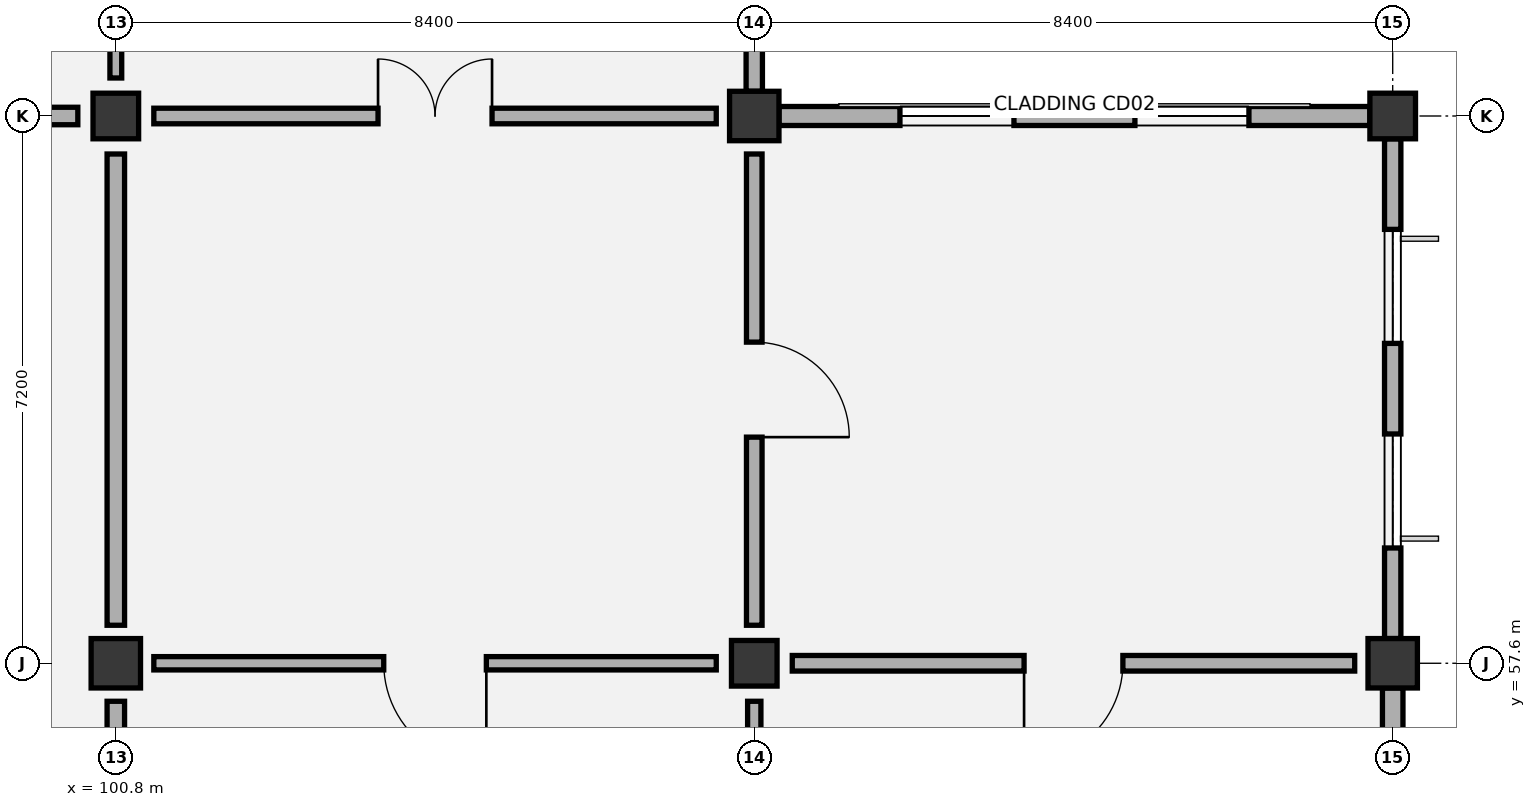
"""IFC4 building model, lengths in metres.
Left out: names, types, materials, properties, quantities, classifications, styles, units other than length and angle.
Written with IfcOpenShell. Run it as: python <this file> out.ifc"""

import sys

from ifc_helpers import new_model, si_unit, direction, frame, frame_2d, origin, origin_2d, place, context, subcontext, project, spatial, rectangle, extrude, element, fill, save


model = new_model("IFC4")
c1 = context("Model", 3, precision=1e-05, world=origin(), true_north=direction((0.0, 1.0)))
c2 = subcontext(c1, "Body", "Model", "MODEL_VIEW")
j1 = project(units=[si_unit("LENGTHUNIT", "METRE"), si_unit("PLANEANGLEUNIT", "RADIAN")], contexts=[c1])
p1 = place(None, origin())
s1 = spatial("IfcSite", under=j1, at=p1, CompositionType="ELEMENT")
p2 = place(p1, origin())
s2 = spatial("IfcBuilding", under=s1, at=p2, CompositionType="ELEMENT")
p3 = place(p2, frame((0.0, 0.0, 56.4)))
s3 = spatial("IfcBuildingStorey", under=s2, at=p3, CompositionType="ELEMENT", Elevation=56.4)
p4 = place(p3, frame((100.8, 57.6, 0.0), z_axis=(0.0, 0.0, 1.0), x_axis=(1.0, 0.0, 0.0)))
e1 = element("IfcColumn", 1, at=p4, inside=s3, PredefinedType="COLUMN", context=c2, shape_type="SweptSolid", body=[
    extrude(rectangle(XDim=0.65, YDim=0.65, at=origin_2d()), origin(), (0.0, 0.0, 1.0), 4.2),
])
for number, where, z_axis, x_axis in (
    (2, (100.8, 64.8, 0.0), (0.0, 0.0, 1.0), (1.0, 0.0, 0.0)),
    (3, (109.2, 57.6, 0.0), (0.0, 0.0, 1.0), (1.0, 0.0, 0.0)),
):
    element("IfcColumn", number, at=place(p3, frame(where, z_axis=z_axis, x_axis=x_axis)), inside=s3, PredefinedType="COLUMN", context=c2, shape_type="SweptSolid", body=[
        extrude(rectangle(XDim=0.6, YDim=0.6, at=origin_2d()), origin(), (0.0, 0.0, 1.0), 4.2),
    ])
for number, where, z_axis, x_axis in (
    (4, (109.2, 64.8, 0.0), (0.0, 0.0, 1.0), (1.0, 0.0, 0.0)),
    (5, (117.6, 57.6, 0.0), (0.0, 0.0, 1.0), (1.0, 0.0, 0.0)),
):
    element("IfcColumn", number, at=place(p3, frame(where, z_axis=z_axis, x_axis=x_axis)), inside=s3, PredefinedType="COLUMN", context=c2, shape_type="SweptSolid", body=[
        extrude(rectangle(XDim=0.65, YDim=0.65, at=origin_2d()), origin(), (0.0, 0.0, 1.0), 4.2),
    ])
p5 = place(p3, frame((117.6, 64.8, 0.0), z_axis=(0.0, 0.0, 1.0), x_axis=(1.0, 0.0, 0.0)))
e6 = element("IfcColumn", 6, at=p5, inside=s3, PredefinedType="COLUMN", context=c2, shape_type="SweptSolid", body=[
    extrude(rectangle(XDim=0.6, YDim=0.6, at=origin_2d()), origin(), (0.0, 0.0, 1.0), 4.2),
])
p6 = place(p3, frame((109.2, 65.125, 0.0), z_axis=(0.0, 0.0, 1.0), x_axis=(0.0, 1.0, 0.0)))
e7 = element("IfcWall", 7, at=p6, inside=s3, PredefinedType="SOLIDWALL", context=c2, shape_type="SweptSolid", body=[
    extrude(rectangle(XDim=6.575, YDim=0.215, at=frame_2d((3.288, 0.0))), origin(), (0.0, 0.0, 1.0), 3.365),
])
p7 = place(p6, frame((1.092, 0.0, 0.95)))
e8 = element("IfcOpeningElement", 8, at=p7, cuts=e7, PredefinedType="OPENING", context=c2, shape_type="SweptSolid", body=[
    extrude(rectangle(XDim=1.65, YDim=1.65, at=frame_2d((0.825, 0.825))), frame((0.0, 0.117, 0.0), z_axis=(0.0, -1.0, 0.0), x_axis=(1.0, 0.0, 0.0)), (0.0, 0.0, 1.0), 0.235),
])
p8 = place(p6, frame((3.833, 0.0, 0.95)))
e9 = element("IfcOpeningElement", 9, at=p8, cuts=e7, PredefinedType="OPENING", context=c2, shape_type="SweptSolid", body=[
    extrude(rectangle(XDim=1.65, YDim=1.65, at=frame_2d((0.825, 0.825))), frame((0.0, 0.117, 0.0), z_axis=(0.0, -1.0, 0.0), x_axis=(1.0, 0.0, 0.0)), (0.0, 0.0, 1.0), 0.235),
])
p9 = place(p3, frame((117.6, 50.7, 0.0), z_axis=(0.0, 0.0, 1.0), x_axis=(0.0, 1.0, 0.0)))
e10 = element("IfcWall", 10, at=p9, inside=s3, PredefinedType="SOLIDWALL", context=c2, shape_type="SweptSolid", body=[
    extrude(rectangle(XDim=6.575, YDim=0.27, at=frame_2d((3.288, 0.0))), origin(), (0.0, 0.0, 1.0), 3.295),
])
p10 = place(p3, frame((109.525, 64.8, 0.0), z_axis=(0.0, 0.0, 1.0), x_axis=(1.0, 0.0, 0.0)))
e11 = element("IfcWall", 11, at=p10, inside=s3, PredefinedType="SOLIDWALL", context=c2, shape_type="SweptSolid", body=[
    extrude(rectangle(XDim=7.775, YDim=0.25, at=frame_2d((3.888, 0.0))), origin(), (0.0, 0.0, 1.0), 3.295),
])
p11 = place(p10, frame((1.592, 0.0, 0.95)))
e12 = element("IfcOpeningElement", 12, at=p11, cuts=e11, PredefinedType="OPENING", context=c2, shape_type="SweptSolid", body=[
    extrude(rectangle(XDim=1.5, YDim=1.5, at=frame_2d((0.75, 0.75))), frame((0.0, 0.135, 0.0), z_axis=(0.0, -1.0, 0.0), x_axis=(1.0, 0.0, 0.0)), (0.0, 0.0, 1.0), 0.27),
])
p12 = place(p10, frame((4.683, 0.0, 0.95)))
e13 = element("IfcOpeningElement", 13, at=p12, cuts=e11, PredefinedType="OPENING", context=c2, shape_type="SweptSolid", body=[
    extrude(rectangle(XDim=1.5, YDim=1.5, at=frame_2d((0.75, 0.75))), frame((0.0, 0.135, 0.0), z_axis=(0.0, -1.0, 0.0), x_axis=(1.0, 0.0, 0.0)), (0.0, 0.0, 1.0), 0.27),
])
p13 = place(p3, frame((117.6, 57.925, 0.0), z_axis=(0.0, 0.0, 1.0), x_axis=(0.0, 1.0, 0.0)))
e14 = element("IfcWall", 14, at=p13, inside=s3, PredefinedType="SOLIDWALL", context=c2, shape_type="SweptSolid", body=[
    extrude(rectangle(XDim=6.575, YDim=0.215, at=frame_2d((3.288, 0.0))), origin(), (0.0, 0.0, 1.0), 3.295),
])
p14 = place(p13, frame((1.192, 0.0, 0.95)))
e15 = element("IfcOpeningElement", 15, at=p14, cuts=e14, PredefinedType="OPENING", context=c2, shape_type="SweptSolid", body=[
    extrude(rectangle(XDim=1.5, YDim=1.5, at=frame_2d((0.75, 0.75))), frame((0.0, 0.117, 0.0), z_axis=(0.0, -1.0, 0.0), x_axis=(1.0, 0.0, 0.0)), (0.0, 0.0, 1.0), 0.235),
])
p15 = place(p13, frame((3.883, 0.0, 0.95)))
e16 = element("IfcOpeningElement", 16, at=p15, cuts=e14, PredefinedType="OPENING", context=c2, shape_type="SweptSolid", body=[
    extrude(rectangle(XDim=1.5, YDim=1.5, at=frame_2d((0.75, 0.75))), frame((0.0, 0.117, 0.0), z_axis=(0.0, -1.0, 0.0), x_axis=(1.0, 0.0, 0.0)), (0.0, 0.0, 1.0), 0.235),
])
p16 = place(p3, frame((100.8, 50.9, 0.0), z_axis=(0.0, 0.0, 1.0), x_axis=(0.0, 1.0, 0.0)))
e17 = element("IfcWall", 17, at=p16, inside=s3, PredefinedType="PARTITIONING", context=c2, shape_type="SweptSolid", body=[
    extrude(rectangle(XDim=6.2, YDim=0.23, at=frame_2d((3.1, 0.0))), origin(), (0.0, 0.0, 1.0), 3.415),
])
p17 = place(p3, frame((100.8, 58.1, 0.0), z_axis=(0.0, 0.0, 1.0), x_axis=(0.0, 1.0, 0.0)))
e18 = element("IfcWall", 18, at=p17, inside=s3, PredefinedType="PARTITIONING", context=c2, shape_type="SweptSolid", body=[
    extrude(rectangle(XDim=6.2, YDim=0.23, at=frame_2d((3.1, 0.0))), origin(), (0.0, 0.0, 1.0), 3.625),
])
p18 = place(p3, frame((92.9, 64.8, 0.0), z_axis=(0.0, 0.0, 1.0), x_axis=(1.0, 0.0, 0.0)))
e19 = element("IfcWall", 19, at=p18, inside=s3, PredefinedType="PARTITIONING", context=c2, shape_type="SweptSolid", body=[
    extrude(rectangle(XDim=7.4, YDim=0.23, at=frame_2d((3.7, 0.0))), origin(), (0.0, 0.0, 1.0), 3.415),
])
p19 = place(p3, frame((100.8, 65.3, 0.0), z_axis=(0.0, 0.0, 1.0), x_axis=(0.0, 1.0, 0.0)))
e20 = element("IfcWall", 20, at=p19, inside=s3, PredefinedType="PARTITIONING", context=c2, shape_type="SweptSolid", body=[
    extrude(rectangle(XDim=6.2, YDim=0.155, at=frame_2d((3.1, 0.0))), origin(), (0.0, 0.0, 1.0), 3.415),
])
p20 = place(p19, frame((0.85, 0.0, 0.0)))
e21 = element("IfcOpeningElement", 21, at=p20, cuts=e20, PredefinedType="OPENING", context=c2, shape_type="SweptSolid", body=[
    extrude(rectangle(XDim=1.6, YDim=2.2, at=frame_2d((0.8, 1.1))), frame((0.0, 0.087, 0.0), z_axis=(0.0, -1.0, 0.0), x_axis=(1.0, 0.0, 0.0)), (0.0, 0.0, 1.0), 0.175),
])
p21 = place(p3, frame((109.2, 50.9, 0.0), z_axis=(0.0, 0.0, 1.0), x_axis=(0.0, 1.0, 0.0)))
e22 = element("IfcWall", 22, at=p21, inside=s3, PredefinedType="PARTITIONING", context=c2, shape_type="SweptSolid", body=[
    extrude(rectangle(XDim=6.2, YDim=0.175, at=frame_2d((3.1, 0.0))), origin(), (0.0, 0.0, 1.0), 3.555),
])
p22 = place(p3, frame((101.3, 57.6, 0.0), z_axis=(0.0, 0.0, 1.0), x_axis=(1.0, 0.0, 0.0)))
e23 = element("IfcWall", 23, at=p22, inside=s3, PredefinedType="PARTITIONING", context=c2, shape_type="SweptSolid", body=[
    extrude(rectangle(XDim=7.4, YDim=0.175, at=frame_2d((3.7, 0.0))), origin(), (0.0, 0.0, 1.0), 3.415),
])
p23 = place(p22, frame((3.025, 0.0, 0.0)))
e24 = element("IfcOpeningElement", 24, at=p23, cuts=e23, PredefinedType="OPENING", context=c2, shape_type="SweptSolid", body=[
    extrude(rectangle(XDim=1.35, YDim=2.15, at=frame_2d((0.675, 1.075))), frame((0.0, 0.097, 0.0), z_axis=(0.0, -1.0, 0.0), x_axis=(1.0, 0.0, 0.0)), (0.0, 0.0, 1.0), 0.195),
])
p24 = place(p3, frame((109.2, 58.1, 0.0), z_axis=(0.0, 0.0, 1.0), x_axis=(0.0, 1.0, 0.0)))
e25 = element("IfcWall", 25, at=p24, inside=s3, PredefinedType="PARTITIONING", context=c2, shape_type="SweptSolid", body=[
    extrude(rectangle(XDim=6.2, YDim=0.205, at=frame_2d((3.1, 0.0))), origin(), (0.0, 0.0, 1.0), 3.345),
])
p25 = place(p24, frame((2.475, 0.0, 0.0)))
e26 = element("IfcOpeningElement", 26, at=p25, cuts=e25, PredefinedType="OPENING", context=c2, shape_type="SweptSolid", body=[
    extrude(rectangle(XDim=1.25, YDim=2.1, at=frame_2d((0.625, 1.05))), frame((0.0, 0.113, 0.0), z_axis=(0.0, -1.0, 0.0), x_axis=(1.0, 0.0, 0.0)), (0.0, 0.0, 1.0), 0.225),
])
p26 = place(p3, frame((101.3, 64.8, 0.0), z_axis=(0.0, 0.0, 1.0), x_axis=(1.0, 0.0, 0.0)))
e27 = element("IfcWall", 27, at=p26, inside=s3, PredefinedType="PARTITIONING", context=c2, shape_type="SweptSolid", body=[
    extrude(rectangle(XDim=7.4, YDim=0.205, at=frame_2d((3.7, 0.0))), origin(), (0.0, 0.0, 1.0), 3.415),
])
p27 = place(p26, frame((2.95, 0.0, 0.0)))
e28 = element("IfcOpeningElement", 28, at=p27, cuts=e27, PredefinedType="OPENING", context=c2, shape_type="SweptSolid", body=[
    extrude(rectangle(XDim=1.5, YDim=2.2, at=frame_2d((0.75, 1.1))), frame((0.0, 0.113, 0.0), z_axis=(0.0, -1.0, 0.0), x_axis=(1.0, 0.0, 0.0)), (0.0, 0.0, 1.0), 0.225),
])
p28 = place(p3, frame((109.7, 57.6, 0.0), z_axis=(0.0, 0.0, 1.0), x_axis=(1.0, 0.0, 0.0)))
e29 = element("IfcWall", 29, at=p28, inside=s3, PredefinedType="PARTITIONING", context=c2, shape_type="SweptSolid", body=[
    extrude(rectangle(XDim=7.4, YDim=0.205, at=frame_2d((3.7, 0.0))), origin(), (0.0, 0.0, 1.0), 3.345),
])
p29 = place(p28, frame((3.05, 0.0, 0.0)))
e30 = element("IfcOpeningElement", 30, at=p29, cuts=e29, PredefinedType="OPENING", context=c2, shape_type="SweptSolid", body=[
    extrude(rectangle(XDim=1.3, YDim=2.15, at=frame_2d((0.65, 1.075))), frame((0.0, 0.113, 0.0), z_axis=(0.0, -1.0, 0.0), x_axis=(1.0, 0.0, 0.0)), (0.0, 0.0, 1.0), 0.225),
])
p30 = place(p11, origin())
e31 = element("IfcWindow", 31, at=p30, inside=s3, PartitioningType="SINGLE_PANEL", PredefinedType="WINDOW", context=c2, shape_type="SweptSolid", body=[
    extrude(rectangle(XDim=1.5, YDim=1.5, at=frame_2d((0.75, 0.75))), frame((0.0, 0.03, 0.0), z_axis=(0.0, -1.0, 0.0), x_axis=(1.0, 0.0, 0.0)), (0.0, 0.0, 1.0), 0.06),
])
fill(e12, e31)
p31 = place(p12, origin())
e32 = element("IfcWindow", 32, at=p31, inside=s3, PartitioningType="SINGLE_PANEL", PredefinedType="WINDOW", context=c2, shape_type="SweptSolid", body=[
    extrude(rectangle(XDim=1.5, YDim=1.5, at=frame_2d((0.75, 0.75))), frame((0.0, 0.03, 0.0), z_axis=(0.0, -1.0, 0.0), x_axis=(1.0, 0.0, 0.0)), (0.0, 0.0, 1.0), 0.06),
])
fill(e13, e32)
p32 = place(p14, origin())
e33 = element("IfcWindow", 33, at=p32, inside=s3, PartitioningType="SINGLE_PANEL", PredefinedType="WINDOW", context=c2, shape_type="SweptSolid", body=[
    extrude(rectangle(XDim=1.5, YDim=1.5, at=frame_2d((0.75, 0.75))), frame((0.0, 0.03, 0.0), z_axis=(0.0, -1.0, 0.0), x_axis=(1.0, 0.0, 0.0)), (0.0, 0.0, 1.0), 0.06),
])
fill(e15, e33)
p33 = place(p15, origin())
e34 = element("IfcWindow", 34, at=p33, inside=s3, PartitioningType="SINGLE_PANEL", PredefinedType="WINDOW", context=c2, shape_type="SweptSolid", body=[
    extrude(rectangle(XDim=1.5, YDim=1.5, at=frame_2d((0.75, 0.75))), frame((0.0, 0.03, 0.0), z_axis=(0.0, -1.0, 0.0), x_axis=(1.0, 0.0, 0.0)), (0.0, 0.0, 1.0), 0.06),
])
fill(e16, e34)
p34 = place(p23, frame((1.35, 0.0, 0.0), z_axis=(0.0, 0.0, 1.0), x_axis=(-1.0, 0.0, 0.0)))
e35 = element("IfcDoor", 35, at=p34, inside=s3, OperationType="SINGLE_SWING_LEFT", PredefinedType="DOOR", context=c2, shape_type="SweptSolid", body=[
    extrude(rectangle(XDim=1.35, YDim=2.15, at=frame_2d((0.675, 1.075))), frame((0.0, 0.025, 0.0), z_axis=(0.0, -1.0, 0.0), x_axis=(1.0, 0.0, 0.0)), (0.0, 0.0, 1.0), 0.05),
])
fill(e24, e35)
p35 = place(p25, frame((1.25, 0.0, 0.0), z_axis=(0.0, 0.0, 1.0), x_axis=(-1.0, 0.0, 0.0)))
e36 = element("IfcDoor", 36, at=p35, inside=s3, OperationType="SINGLE_SWING_RIGHT", PredefinedType="DOOR", context=c2, shape_type="SweptSolid", body=[
    extrude(rectangle(XDim=1.25, YDim=2.1, at=frame_2d((0.625, 1.05))), frame((0.0, 0.025, 0.0), z_axis=(0.0, -1.0, 0.0), x_axis=(1.0, 0.0, 0.0)), (0.0, 0.0, 1.0), 0.05),
])
fill(e26, e36)
p36 = place(p27, origin())
e37 = element("IfcDoor", 37, at=p36, inside=s3, OperationType="DOUBLE_DOOR_SINGLE_SWING", PredefinedType="DOOR", context=c2, shape_type="SweptSolid", body=[
    extrude(rectangle(XDim=1.5, YDim=2.2, at=frame_2d((0.75, 1.1))), frame((0.0, 0.025, 0.0), z_axis=(0.0, -1.0, 0.0), x_axis=(1.0, 0.0, 0.0)), (0.0, 0.0, 1.0), 0.05),
])
fill(e28, e37)
p37 = place(p29, frame((1.3, 0.0, 0.0), z_axis=(0.0, 0.0, 1.0), x_axis=(-1.0, 0.0, 0.0)))
e38 = element("IfcDoor", 38, at=p37, inside=s3, OperationType="SINGLE_SWING_RIGHT", PredefinedType="DOOR", context=c2, shape_type="SweptSolid", body=[
    extrude(rectangle(XDim=1.3, YDim=2.15, at=frame_2d((0.65, 1.075))), frame((0.0, 0.025, 0.0), z_axis=(0.0, -1.0, 0.0), x_axis=(1.0, 0.0, 0.0)), (0.0, 0.0, 1.0), 0.05),
])
fill(e30, e38)
save(model, sys.argv[1])
